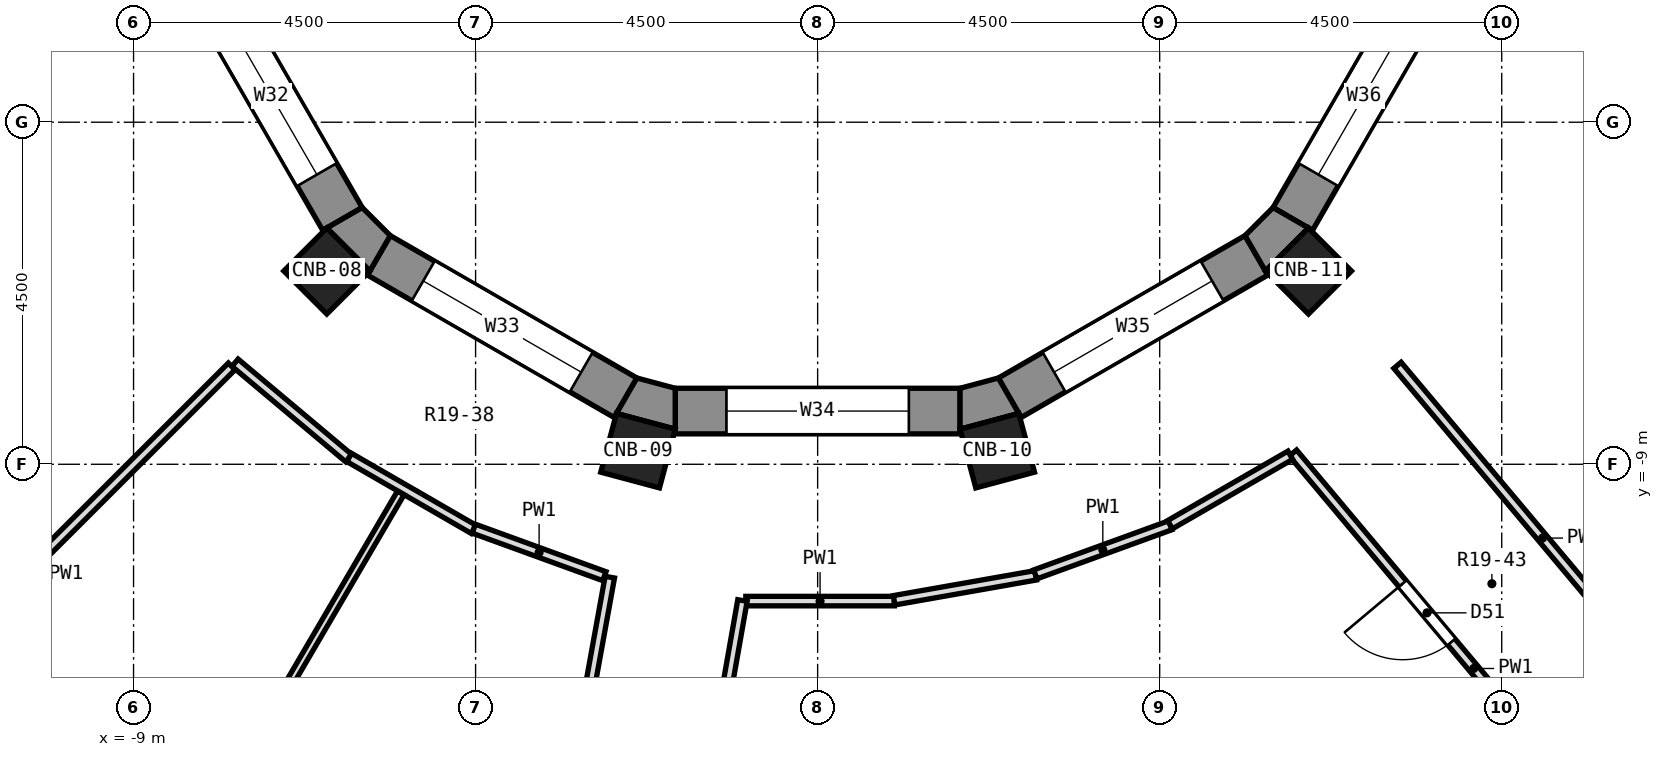
"""IFC4 building model, lengths in metres.
Left out: names, types, materials, properties, quantities, classifications, styles, units other than length and angle.
Written with IfcOpenShell. Run it as: python <this file> out.ifc"""

import sys

from ifc_helpers import new_model, si_unit, direction, frame, frame_2d, origin, origin_2d, place, context, subcontext, project, spatial, polyline, rectangle, outline, extrude, element, fill, save


model = new_model("IFC4")
c1 = context("Model", 3, precision=1e-05, world=origin(), true_north=direction((0.0, 1.0)))
c2 = subcontext(c1, "Body", "Model", "MODEL_VIEW")
j1 = project(units=[si_unit("LENGTHUNIT", "METRE"), si_unit("PLANEANGLEUNIT", "RADIAN")], contexts=[c1])
p1 = place(None, origin())
s1 = spatial("IfcSite", under=j1, at=p1, CompositionType="ELEMENT")
p2 = place(p1, origin())
s2 = spatial("IfcBuilding", under=s1, at=p2, CompositionType="ELEMENT")
p3 = place(p2, frame((0.0, 0.0, 111.7)))
s3 = spatial("IfcBuildingStorey", under=s2, at=p3, CompositionType="ELEMENT", Elevation=111.7)
for number, where, z_axis, x_axis in (
    (1, (-6.458, -6.458, 0.0), (0.0, 0.0, 1.0), (-0.707, -0.707, 0.0)),
    (2, (-2.364, -8.821, 0.0), (0.0, 0.0, 1.0), (-0.259, -0.966, 0.0)),
    (3, (2.364, -8.821, 0.0), (0.0, 0.0, 1.0), (0.259, -0.966, 0.0)),
    (4, (6.458, -6.458, 0.0), (0.0, 0.0, 1.0), (0.707, -0.707, 0.0)),
):
    element("IfcColumn", number, at=place(p3, frame(where, z_axis=z_axis, x_axis=x_axis)), inside=s3, PredefinedType="COLUMN", context=c2, shape_type="SweptSolid", body=[
        extrude(rectangle(XDim=0.8, YDim=0.8, at=origin_2d()), origin(), (0.0, 0.0, 1.0), 3.3),
    ])
p4 = place(p3, frame((-8.125, -2.527, 0.0), z_axis=(0.0, 0.0, 1.0), x_axis=(0.499964958637, -0.86604563398, 0.0)))
e5 = element("IfcWall", 5, at=p4, inside=s3, PredefinedType="SOLIDWALL", context=c2, shape_type="SweptSolid", body=[
    extrude(rectangle(XDim=3.747, YDim=0.6, at=frame_2d((1.874, 0.0))), origin(), (0.0, 0.0, 1.0), 2.8),
])
p5 = place(p4, frame((0.674, 0.0, 0.9)))
e6 = element("IfcOpeningElement", 6, at=p5, cuts=e5, PredefinedType="OPENING", context=c2, shape_type="SweptSolid", body=[
    extrude(rectangle(XDim=2.4, YDim=1.8, at=frame_2d((1.2, 0.9))), frame((0.0, 0.312, 0.0), z_axis=(0.0, -1.0, 0.0), x_axis=(1.0, 0.0, 0.0)), (0.0, 0.0, 1.0), 0.624),
])
p6 = place(p3, frame((-5.773, -6.251, 0.0), z_axis=(0.0, 0.0, 1.0), x_axis=(0.86604563398, -0.499964958637, 0.0)))
e7 = element("IfcWall", 7, at=p6, inside=s3, PredefinedType="SOLIDWALL", context=c2, shape_type="SweptSolid", body=[
    extrude(rectangle(XDim=3.747, YDim=0.6, at=frame_2d((1.874, 0.0))), origin(), (0.0, 0.0, 1.0), 2.8),
])
p7 = place(p6, frame((0.674, 0.0, 0.9)))
e8 = element("IfcOpeningElement", 8, at=p7, cuts=e7, PredefinedType="OPENING", context=c2, shape_type="SweptSolid", body=[
    extrude(rectangle(XDim=2.4, YDim=1.8, at=frame_2d((1.2, 0.9))), frame((0.0, 0.312, 0.0), z_axis=(0.0, -1.0, 0.0), x_axis=(1.0, 0.0, 0.0)), (0.0, 0.0, 1.0), 0.624),
])
p8 = place(p3, frame((-1.874, -8.3, 0.0), z_axis=(0.0, 0.0, 1.0), x_axis=(1.0, 0.0, 0.0)))
e9 = element("IfcWall", 9, at=p8, inside=s3, PredefinedType="SOLIDWALL", context=c2, shape_type="SweptSolid", body=[
    extrude(rectangle(XDim=3.748, YDim=0.6, at=frame_2d((1.874, 0.0))), origin(), (0.0, 0.0, 1.0), 2.8),
])
p9 = place(p8, frame((0.674, 0.0, 0.9)))
e10 = element("IfcOpeningElement", 10, at=p9, cuts=e9, PredefinedType="OPENING", context=c2, shape_type="SweptSolid", body=[
    extrude(rectangle(XDim=2.4, YDim=1.8, at=frame_2d((1.2, 0.9))), frame((0.0, 0.312, 0.0), z_axis=(0.0, -1.0, 0.0), x_axis=(1.0, 0.0, 0.0)), (0.0, 0.0, 1.0), 0.624),
])
p10 = place(p3, frame((2.527, -8.125, 0.0), z_axis=(0.0, 0.0, 1.0), x_axis=(0.86604563398, 0.499964958637, 0.0)))
e11 = element("IfcWall", 11, at=p10, inside=s3, PredefinedType="SOLIDWALL", context=c2, shape_type="SweptSolid", body=[
    extrude(rectangle(XDim=3.747, YDim=0.6, at=frame_2d((1.874, 0.0))), origin(), (0.0, 0.0, 1.0), 2.8),
])
p11 = place(p10, frame((0.674, 0.0, 0.9)))
e12 = element("IfcOpeningElement", 12, at=p11, cuts=e11, PredefinedType="OPENING", context=c2, shape_type="SweptSolid", body=[
    extrude(rectangle(XDim=2.4, YDim=1.8, at=frame_2d((1.2, 0.9))), frame((0.0, 0.312, 0.0), z_axis=(0.0, -1.0, 0.0), x_axis=(1.0, 0.0, 0.0)), (0.0, 0.0, 1.0), 0.624),
])
p12 = place(p3, frame((6.251, -5.773, 0.0), z_axis=(0.0, 0.0, 1.0), x_axis=(0.499964958637, 0.86604563398, 0.0)))
e13 = element("IfcWall", 13, at=p12, inside=s3, PredefinedType="SOLIDWALL", context=c2, shape_type="SweptSolid", body=[
    extrude(rectangle(XDim=3.747, YDim=0.6, at=frame_2d((1.874, 0.0))), origin(), (0.0, 0.0, 1.0), 2.8),
])
p13 = place(p12, frame((0.674, 0.0, 0.9)))
e14 = element("IfcOpeningElement", 14, at=p13, cuts=e13, PredefinedType="OPENING", context=c2, shape_type="SweptSolid", body=[
    extrude(rectangle(XDim=2.4, YDim=1.8, at=frame_2d((1.2, 0.9))), frame((0.0, 0.312, 0.0), z_axis=(0.0, -1.0, 0.0), x_axis=(1.0, 0.0, 0.0)), (0.0, 0.0, 1.0), 0.624),
])
p14 = place(p3, origin())
e15 = element("IfcWall", 15, at=p14, inside=s3, PredefinedType="SOLIDWALL", context=c2, shape_type="SweptSolid", body=[
    extrude(outline(polyline([(-6.458, -5.892), (-5.892, -6.458), (-5.623, -5.991), (-5.991, -5.623), (-6.458, -5.892)])), origin(), (0.0, 0.0, 1.0), 2.8),
])
p15 = place(p3, origin())
e16 = element("IfcWall", 16, at=p15, inside=s3, PredefinedType="SOLIDWALL", context=c2, shape_type="SweptSolid", body=[
    extrude(outline(polyline([(-1.874, -8.538), (-1.874, -8.0), (-2.377, -7.865), (-2.646, -8.331), (-1.874, -8.538)])), origin(), (0.0, 0.0, 1.0), 2.8),
])
p16 = place(p3, origin())
e17 = element("IfcWall", 17, at=p16, inside=s3, PredefinedType="SOLIDWALL", context=c2, shape_type="SweptSolid", body=[
    extrude(outline(polyline([(2.646, -8.331), (2.377, -7.865), (1.874, -8.0), (1.874, -8.538), (2.646, -8.331)])), origin(), (0.0, 0.0, 1.0), 2.8),
])
p17 = place(p3, origin())
e18 = element("IfcWall", 18, at=p17, inside=s3, PredefinedType="SOLIDWALL", context=c2, shape_type="SweptSolid", body=[
    extrude(outline(polyline([(5.892, -6.458), (6.458, -5.892), (5.991, -5.623), (5.623, -5.991), (5.892, -6.458)])), origin(), (0.0, 0.0, 1.0), 2.8),
])
p18 = place(p3, frame((6.253, -8.852, 0.0), z_axis=(0.0, 0.0, 1.0), x_axis=(0.642738639283, -0.766085531499, 0.0)))
e19 = element("IfcWall", 19, at=p18, inside=s3, PredefinedType="PARTITIONING", context=c2, shape_type="SweptSolid", body=[
    extrude(rectangle(XDim=5.999, YDim=0.125, at=frame_2d((3.0, 0.0))), origin(), (0.0, 0.0, 1.0), 2.8),
])
p19 = place(p18, frame((2.244, 0.0, 0.0)))
e20 = element("IfcOpeningElement", 20, at=p19, cuts=e19, PredefinedType="OPENING", context=c2, shape_type="SweptSolid", body=[
    extrude(rectangle(XDim=1.0, YDim=2.1, at=frame_2d((0.5, 1.05))), frame((0.0, 0.074, 0.0), z_axis=(0.0, -1.0, 0.0), x_axis=(1.0, 0.0, 0.0)), (0.0, 0.0, 1.0), 0.149),
])
p20 = place(p3, frame((7.629, -7.698, 0.0), z_axis=(0.0, 0.0, 1.0), x_axis=(0.642971202284, -0.76589035314, 0.0)))
e21 = element("IfcWall", 21, at=p20, inside=s3, PredefinedType="PARTITIONING", context=c2, shape_type="SweptSolid", body=[
    extrude(rectangle(XDim=5.937, YDim=0.125, at=frame_2d((2.968, 0.0))), origin(), (0.0, 0.0, 1.0), 2.8),
])
p21 = place(p3, frame((-7.665, -7.664, 0.0), z_axis=(0.0, 0.0, 1.0), x_axis=(0.766086332365, -0.642737684723, 0.0)))
e22 = element("IfcWall", 22, at=p21, inside=s3, PredefinedType="PARTITIONING", context=c2, shape_type="SweptSolid", body=[
    extrude(rectangle(XDim=1.954, YDim=0.125, at=frame_2d((0.977, 0.0))), origin(), (0.0, 0.0, 1.0), 2.8),
])
p22 = place(p3, frame((-6.163, -8.91, 0.0), z_axis=(0.0, 0.0, 1.0), x_axis=(0.865856369022, -0.500292662572, 0.0)))
e23 = element("IfcWall", 23, at=p22, inside=s3, PredefinedType="PARTITIONING", context=c2, shape_type="SweptSolid", body=[
    extrude(rectangle(XDim=1.89, YDim=0.125, at=frame_2d((0.945, 0.0))), origin(), (0.0, 0.0, 1.0), 2.8),
])
p23 = place(p3, frame((-4.523, -9.847, 0.0), z_axis=(0.0, 0.0, 1.0), x_axis=(0.939758316357, -0.341839592261, 0.0)))
e24 = element("IfcWall", 24, at=p23, inside=s3, PredefinedType="PARTITIONING", context=c2, shape_type="SweptSolid", body=[
    extrude(rectangle(XDim=1.828, YDim=0.125, at=frame_2d((0.914, 0.0))), origin(), (0.0, 0.0, 1.0), 2.8),
])
p24 = place(p3, frame((-0.945, -10.8, 0.0), z_axis=(0.0, 0.0, 1.0), x_axis=(1.0, 0.0, 0.0)))
e25 = element("IfcWall", 25, at=p24, inside=s3, PredefinedType="PARTITIONING", context=c2, shape_type="SweptSolid", body=[
    extrude(rectangle(XDim=1.954, YDim=0.125, at=frame_2d((0.977, 0.0))), origin(), (0.0, 0.0, 1.0), 2.8),
])
p25 = place(p3, frame((1.007, -10.789, 0.0), z_axis=(0.0, 0.0, 1.0), x_axis=(0.984818645033, 0.173586394613, 0.0)))
e26 = element("IfcWall", 26, at=p25, inside=s3, PredefinedType="PARTITIONING", context=c2, shape_type="SweptSolid", body=[
    extrude(rectangle(XDim=1.89, YDim=0.125, at=frame_2d((0.945, 0.0))), origin(), (0.0, 0.0, 1.0), 2.8),
])
p26 = place(p3, frame((2.864, -10.449, 0.0), z_axis=(0.0, 0.0, 1.0), x_axis=(0.939733090163, 0.341908934151, 0.0)))
e27 = element("IfcWall", 27, at=p26, inside=s3, PredefinedType="PARTITIONING", context=c2, shape_type="SweptSolid", body=[
    extrude(rectangle(XDim=1.891, YDim=0.125, at=frame_2d((0.945, 0.0))), origin(), (0.0, 0.0, 1.0), 2.8),
])
p27 = place(p3, frame((4.636, -9.795, 0.0), z_axis=(0.0, 0.0, 1.0), x_axis=(0.865889515344, 0.500235291855, 0.0)))
e28 = element("IfcWall", 28, at=p27, inside=s3, PredefinedType="PARTITIONING", context=c2, shape_type="SweptSolid", body=[
    extrude(rectangle(XDim=1.827, YDim=0.125, at=frame_2d((0.913, 0.0))), origin(), (0.0, 0.0, 1.0), 2.8),
])
p28 = place(p3, frame((-13.167, -13.166, 0.0), z_axis=(0.0, 0.0, 1.0), x_axis=(0.707391477554, 0.706821970148, 0.0)))
e29 = element("IfcWall", 29, at=p28, inside=s3, PredefinedType="PARTITIONING", context=c2, shape_type="SweptSolid", body=[
    extrude(rectangle(XDim=7.716, YDim=0.125, at=frame_2d((3.858, 0.0))), origin(), (0.0, 0.0, 1.0), 2.8),
])
p29 = place(p3, frame((-9.366, -16.012, 0.0), z_axis=(0.0, 0.0, 1.0), x_axis=(0.504907426376, 0.863173499819, 0.0)))
e30 = element("IfcWall", 30, at=p29, inside=s3, PredefinedType="PARTITIONING", context=c2, shape_type="SweptSolid", body=[
    extrude(rectangle(XDim=7.687, YDim=0.1, at=frame_2d((3.843, 0.0))), origin(), (0.0, 0.0, 1.0), 2.8),
])
p30 = place(p29, frame((3.4, 0.0, 0.0)))
e31 = element("IfcOpeningElement", 31, at=p30, cuts=e30, PredefinedType="OPENING", context=c2, shape_type="SweptSolid", body=[
    extrude(rectangle(XDim=0.9, YDim=2.1, at=frame_2d((0.45, 1.05))), frame((0.0, 0.062, 0.0), z_axis=(0.0, -1.0, 0.0), x_axis=(1.0, 0.0, 0.0)), (0.0, 0.0, 1.0), 0.124),
])
p31 = place(p3, frame((-3.793, -16.325, 0.0), z_axis=(0.0, 0.0, 1.0), x_axis=(0.178389527964, 0.983959946498, 0.0)))
e32 = element("IfcWall", 32, at=p31, inside=s3, PredefinedType="PARTITIONING", context=c2, shape_type="SweptSolid", body=[
    extrude(rectangle(XDim=5.936, YDim=0.125, at=frame_2d((2.968, 0.0))), origin(), (0.0, 0.0, 1.0), 2.8),
])
p32 = place(p3, frame((-2.02, -16.639, 0.0), z_axis=(0.0, 0.0, 1.0), x_axis=(0.17368681293, 0.984800939791, 0.0)))
e33 = element("IfcWall", 33, at=p32, inside=s3, PredefinedType="PARTITIONING", context=c2, shape_type="SweptSolid", body=[
    extrude(rectangle(XDim=5.938, YDim=0.125, at=frame_2d((2.969, 0.0))), origin(), (0.0, 0.0, 1.0), 2.8),
])
p33 = place(p5, origin())
e34 = element("IfcWindow", 34, at=p33, inside=s3, PartitioningType="SINGLE_PANEL", PredefinedType="WINDOW", context=c2, shape_type="SweptSolid", body=[
    extrude(rectangle(XDim=2.4, YDim=1.8, at=frame_2d((1.2, 0.9))), frame((0.0, -0.12, 0.0), z_axis=(0.0, -1.0, 0.0), x_axis=(1.0, 0.0, 0.0)), (0.0, 0.0, 1.0), 0.06),
])
fill(e6, e34)
p34 = place(p7, origin())
e35 = element("IfcWindow", 35, at=p34, inside=s3, PartitioningType="SINGLE_PANEL", PredefinedType="WINDOW", context=c2, shape_type="SweptSolid", body=[
    extrude(rectangle(XDim=2.4, YDim=1.8, at=frame_2d((1.2, 0.9))), frame((0.0, -0.12, 0.0), z_axis=(0.0, -1.0, 0.0), x_axis=(1.0, 0.0, 0.0)), (0.0, 0.0, 1.0), 0.06),
])
fill(e8, e35)
p35 = place(p9, origin())
e36 = element("IfcWindow", 36, at=p35, inside=s3, PartitioningType="SINGLE_PANEL", PredefinedType="WINDOW", context=c2, shape_type="SweptSolid", body=[
    extrude(rectangle(XDim=2.4, YDim=1.8, at=frame_2d((1.2, 0.9))), frame((0.0, -0.12, 0.0), z_axis=(0.0, -1.0, 0.0), x_axis=(1.0, 0.0, 0.0)), (0.0, 0.0, 1.0), 0.06),
])
fill(e10, e36)
p36 = place(p11, origin())
e37 = element("IfcWindow", 37, at=p36, inside=s3, PartitioningType="SINGLE_PANEL", PredefinedType="WINDOW", context=c2, shape_type="SweptSolid", body=[
    extrude(rectangle(XDim=2.4, YDim=1.8, at=frame_2d((1.2, 0.9))), frame((0.0, -0.12, 0.0), z_axis=(0.0, -1.0, 0.0), x_axis=(1.0, 0.0, 0.0)), (0.0, 0.0, 1.0), 0.06),
])
fill(e12, e37)
p37 = place(p13, origin())
e38 = element("IfcWindow", 38, at=p37, inside=s3, PartitioningType="SINGLE_PANEL", PredefinedType="WINDOW", context=c2, shape_type="SweptSolid", body=[
    extrude(rectangle(XDim=2.4, YDim=1.8, at=frame_2d((1.2, 0.9))), frame((0.0, -0.12, 0.0), z_axis=(0.0, -1.0, 0.0), x_axis=(1.0, 0.0, 0.0)), (0.0, 0.0, 1.0), 0.06),
])
fill(e14, e38)
p38 = place(p19, frame((1.0, 0.0, 0.0), z_axis=(0.0, 0.0, 1.0), x_axis=(-1.0, 0.0, 0.0)))
e39 = element("IfcDoor", 39, at=p38, inside=s3, OperationType="SINGLE_SWING_RIGHT", PredefinedType="DOOR", context=c2, shape_type="SweptSolid", body=[
    extrude(rectangle(XDim=1.0, YDim=2.1, at=frame_2d((0.5, 1.05))), frame((0.0, 0.025, 0.0), z_axis=(0.0, -1.0, 0.0), x_axis=(1.0, 0.0, 0.0)), (0.0, 0.0, 1.0), 0.05),
])
fill(e20, e39)
save(model, sys.argv[1])
